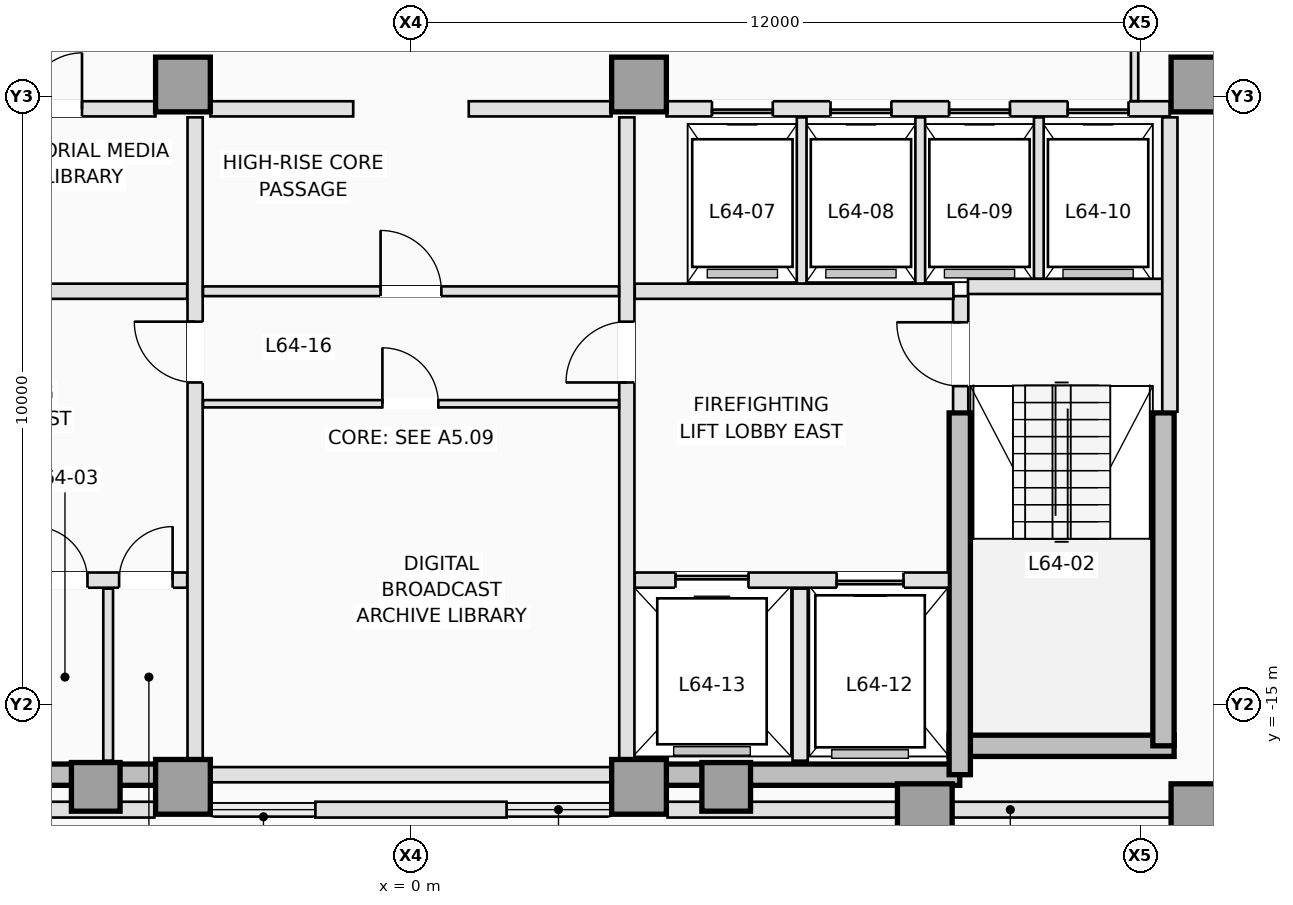
"""IFC4 building model, lengths in metres.
Left out: names, types, materials, properties, quantities, classifications, styles, units other than length and angle.
Written with IfcOpenShell. Run it as: python <this file> out.ifc"""

import sys

from ifc_helpers import new_model, si_unit, direction, frame, frame_2d, origin, origin_2d, place, context, subcontext, project, spatial, rectangle, extrude, element, fill, save


model = new_model("IFC4")
c1 = context("Model", 3, precision=1e-05, world=origin(), true_north=direction((0.0, 1.0)))
c2 = subcontext(c1, "Body", "Model", "MODEL_VIEW")
j1 = project(units=[si_unit("LENGTHUNIT", "METRE"), si_unit("PLANEANGLEUNIT", "RADIAN")], contexts=[c1])
p1 = place(None, origin())
s1 = spatial("IfcSite", under=j1, at=p1, CompositionType="ELEMENT")
p2 = place(p1, origin())
s2 = spatial("IfcBuilding", under=s1, at=p2, CompositionType="ELEMENT")
p3 = place(p2, frame((0.0, 0.0, 232.4)))
s3 = spatial("IfcBuildingStorey", under=s2, at=p3, CompositionType="ELEMENT", Elevation=232.4)
for number, where, z_axis, x_axis in (
    (1, (-9.025, -16.15, 0.0), (0.0, 0.0, 1.0), (1.0, 0.0, 0.0)),
    (2, (3.75, -16.15, 0.0), (0.0, 0.0, 1.0), (1.0, 0.0, 0.0)),
):
    element("IfcWall", number, at=place(p3, frame(where, z_axis=z_axis, x_axis=x_axis)), inside=s3, PredefinedType="SHEAR", context=c2, shape_type="SweptSolid", body=[
        extrude(rectangle(XDim=5.275, YDim=0.35, at=frame_2d((2.637, 0.0))), origin(), (0.0, 0.0, 1.0), 3.5),
    ])
p4 = place(p3, frame((8.85, -15.675, 0.0), z_axis=(0.0, 0.0, 1.0), x_axis=(1.0, 0.0, 0.0)))
e3 = element("IfcWall", 3, at=p4, inside=s3, PredefinedType="SHEAR", context=c2, shape_type="SweptSolid", body=[
    extrude(rectangle(XDim=3.7, YDim=0.35, at=frame_2d((1.85, 0.0))), origin(), (0.0, 0.0, 1.0), 3.5),
])
p5 = place(p3, frame((12.375, -15.675, 0.0), z_axis=(0.0, 0.0, 1.0), x_axis=(0.0, 1.0, 0.0)))
e4 = element("IfcWall", 4, at=p5, inside=s3, PredefinedType="SHEAR", context=c2, shape_type="SweptSolid", body=[
    extrude(rectangle(XDim=5.475, YDim=0.35, at=frame_2d((2.738, 0.0))), origin(), (0.0, 0.0, 1.0), 3.5),
])
p6 = place(p3, frame((9.025, -16.15, 0.0), z_axis=(0.0, 0.0, 1.0), x_axis=(0.0, 1.0, 0.0)))
e5 = element("IfcWall", 5, at=p6, inside=s3, PredefinedType="SHEAR", context=c2, shape_type="SweptSolid", body=[
    extrude(rectangle(XDim=5.95, YDim=0.35, at=frame_2d((2.975, 0.0))), origin(), (0.0, 0.0, 1.0), 3.5),
])
for number, where, z_axis, x_axis in (
    (6, (-3.75, -16.35, 0.0), (0.0, 0.0, 1.0), (1.0, 0.0, 0.0)),
    (7, (3.75, -16.35, 0.0), (0.0, 0.0, 1.0), (1.0, 0.0, 0.0)),
    (8, (8.45, -16.75, 0.0), (0.0, 0.0, 1.0), (1.0, 0.0, 0.0)),
    (9, (12.95, -16.75, 0.0), (0.0, 0.0, 1.0), (1.0, 0.0, 0.0)),
    (10, (-3.75, -4.8, 0.0), (0.0, 0.0, 1.0), (1.0, 0.0, 0.0)),
    (11, (3.75, -4.8, 0.0), (0.0, 0.0, 1.0), (1.0, 0.0, 0.0)),
    (12, (12.95, -4.8, 0.0), (0.0, 0.0, 1.0), (1.0, 0.0, 0.0)),
):
    element("IfcColumn", number, at=place(p3, frame(where, z_axis=z_axis, x_axis=x_axis)), inside=s3, PredefinedType="COLUMN", context=c2, shape_type="SweptSolid", body=[
        extrude(rectangle(XDim=0.9, YDim=0.9, at=origin_2d()), origin(), (0.0, 0.0, 1.0), 3.5),
    ])
for number, where, z_axis, x_axis in (
    (13, (-5.184, -16.35, 0.0), (0.0, 0.0, 1.0), (0.0, 1.0, 0.0)),
    (14, (5.184, -16.35, 0.0), (0.0, 0.0, 1.0), (0.0, 1.0, 0.0)),
):
    element("IfcColumn", number, at=place(p3, frame(where, z_axis=z_axis, x_axis=x_axis)), inside=s3, PredefinedType="COLUMN", context=c2, shape_type="SweptSolid", body=[
        extrude(rectangle(XDim=0.8, YDim=0.8, at=origin_2d()), origin(), (0.0, 0.0, 1.0), 3.5),
    ])
for number, where, z_axis, x_axis in (
    (15, (15.493, -16.725, 0.0), (0.0, 0.0, 1.0), (-1.0, 0.0, 0.0)),
    (16, (-4.22, -16.725, 0.0), (0.0, 0.0, 1.0), (-1.0, 0.0, 0.0)),
):
    element("IfcWall", number, at=place(p3, frame(where, z_axis=z_axis, x_axis=x_axis)), inside=s3, PredefinedType="STANDARD", context=c2, shape_type="SweptSolid", body=[
        extrude(rectangle(XDim=11.273, YDim=0.26, at=frame_2d((5.636, 0.0))), origin(), (0.0, 0.0, 1.0), 2.79),
    ])
p7 = place(p3, frame((1.572, -16.725, 0.0), z_axis=(0.0, 0.0, 1.0), x_axis=(-1.0, 0.0, 0.0)))
e17 = element("IfcWall", 17, at=p7, inside=s3, PredefinedType="STANDARD", context=c2, shape_type="SweptSolid", body=[
    extrude(rectangle(XDim=3.143, YDim=0.26, at=frame_2d((1.572, 0.0))), origin(), (0.0, 0.0, 1.0), 3.25),
])
p8 = place(p3, frame((9.04, -10.18, 0.0), z_axis=(0.0, 0.0, 1.0), x_axis=(0.0, 1.0, 0.0)))
e18 = element("IfcWall", 18, at=p8, inside=s3, PredefinedType="PARTITIONING", context=c2, shape_type="SweptSolid", body=[
    extrude(rectangle(XDim=1.9, YDim=0.25, at=frame_2d((0.95, 0.0))), origin(), (0.0, 0.0, 1.0), 3.25),
])
p9 = place(p8, frame((0.42, 0.0, 0.0)))
e19 = element("IfcOpeningElement", 19, at=p9, cuts=e18, PredefinedType="OPENING", context=c2, shape_type="SweptSolid", body=[
    extrude(rectangle(XDim=1.05, YDim=2.15, at=frame_2d((0.525, 1.075))), frame((0.0, 0.135, 0.0), z_axis=(0.0, -1.0, 0.0), x_axis=(1.0, 0.0, 0.0)), (0.0, 0.0, 1.0), 0.27),
])
p10 = place(p3, frame((9.16, -8.12, 0.0), z_axis=(0.0, 0.0, 1.0), x_axis=(1.0, 0.0, 0.0)))
e20 = element("IfcWall", 20, at=p10, inside=s3, PredefinedType="PARTITIONING", context=c2, shape_type="SweptSolid", body=[
    extrude(rectangle(XDim=3.22, YDim=0.25, at=frame_2d((1.61, 0.0))), origin(), (0.0, 0.0, 1.0), 3.25),
])
p11 = place(p3, frame((12.48, -10.18, 0.0), z_axis=(0.0, 0.0, 1.0), x_axis=(0.0, 1.0, 0.0)))
e21 = element("IfcWall", 21, at=p11, inside=s3, PredefinedType="PARTITIONING", context=c2, shape_type="SweptSolid", body=[
    extrude(rectangle(XDim=4.84, YDim=0.25, at=frame_2d((2.42, 0.0))), origin(), (0.0, 0.0, 1.0), 3.25),
])
p12 = place(p3, frame((-8.848, -12.95, 0.0), z_axis=(0.0, 0.0, 1.0), x_axis=(1.0, 0.0, 0.0)))
e22 = element("IfcWall", 22, at=p12, inside=s3, PredefinedType="PARTITIONING", context=c2, shape_type="SweptSolid", body=[
    extrude(rectangle(XDim=5.168, YDim=0.25, at=frame_2d((2.584, 0.0))), origin(), (0.0, 0.0, 1.0), 3.25),
])
p13 = place(p12, frame((0.748, 0.0, 0.0)))
e23 = element("IfcOpeningElement", 23, at=p13, cuts=e22, PredefinedType="OPENING", context=c2, shape_type="SweptSolid", body=[
    extrude(rectangle(XDim=1.1, YDim=2.15, at=frame_2d((0.55, 1.075))), frame((0.0, 0.135, 0.0), z_axis=(0.0, -1.0, 0.0), x_axis=(1.0, 0.0, 0.0)), (0.0, 0.0, 1.0), 0.27),
])
p14 = place(p12, frame((2.648, 0.0, 0.0)))
e24 = element("IfcOpeningElement", 24, at=p14, cuts=e22, PredefinedType="OPENING", context=c2, shape_type="SweptSolid", body=[
    extrude(rectangle(XDim=0.88, YDim=2.1, at=frame_2d((0.44, 1.05))), frame((0.0, 0.135, 0.0), z_axis=(0.0, -1.0, 0.0), x_axis=(1.0, 0.0, 0.0)), (0.0, 0.0, 1.0), 0.27),
])
p15 = place(p12, frame((4.048, 0.0, 0.0)))
e25 = element("IfcOpeningElement", 25, at=p15, cuts=e22, PredefinedType="OPENING", context=c2, shape_type="SweptSolid", body=[
    extrude(rectangle(XDim=0.88, YDim=2.1, at=frame_2d((0.44, 1.05))), frame((0.0, 0.135, 0.0), z_axis=(0.0, -1.0, 0.0), x_axis=(1.0, 0.0, 0.0)), (0.0, 0.0, 1.0), 0.27),
])
p16 = place(p3, frame((3.68, -12.95, 0.0), z_axis=(0.0, 0.0, 1.0), x_axis=(1.0, 0.0, 0.0)))
e26 = element("IfcWall", 26, at=p16, inside=s3, PredefinedType="PARTITIONING", context=c2, shape_type="SweptSolid", body=[
    extrude(rectangle(XDim=5.168, YDim=0.25, at=frame_2d((2.584, 0.0))), origin(), (0.0, 0.0, 1.0), 3.25),
])
p17 = place(p16, frame((3.32, 0.0, 0.0)))
e27 = element("IfcOpeningElement", 27, at=p17, cuts=e26, PredefinedType="OPENING", context=c2, shape_type="SweptSolid", body=[
    extrude(rectangle(XDim=1.1, YDim=2.15, at=frame_2d((0.55, 1.075))), frame((0.0, 0.135, 0.0), z_axis=(0.0, -1.0, 0.0), x_axis=(1.0, 0.0, 0.0)), (0.0, 0.0, 1.0), 0.27),
])
p18 = place(p16, frame((0.67, 0.0, 0.0)))
e28 = element("IfcOpeningElement", 28, at=p18, cuts=e26, PredefinedType="OPENING", context=c2, shape_type="SweptSolid", body=[
    extrude(rectangle(XDim=1.2, YDim=2.15, at=frame_2d((0.6, 1.075))), frame((0.0, 0.135, 0.0), z_axis=(0.0, -1.0, 0.0), x_axis=(1.0, 0.0, 0.0)), (0.0, 0.0, 1.0), 0.27),
])
p19 = place(p3, frame((-4.98, -15.92, 0.0), z_axis=(0.0, 0.0, 1.0), x_axis=(0.0, 1.0, 0.0)))
e29 = element("IfcWall", 29, at=p19, inside=s3, PredefinedType="PARTITIONING", context=c2, shape_type="SweptSolid", body=[
    extrude(rectangle(XDim=2.83, YDim=0.16, at=frame_2d((1.415, 0.0))), origin(), (0.0, 0.0, 1.0), 3.25),
])
p20 = place(p3, frame((6.4, -15.92, 0.0), z_axis=(0.0, 0.0, 1.0), x_axis=(0.0, 1.0, 0.0)))
e30 = element("IfcWall", 30, at=p20, inside=s3, PredefinedType="PARTITIONING", context=c2, shape_type="SweptSolid", body=[
    extrude(rectangle(XDim=2.83, YDim=0.25, at=frame_2d((1.415, 0.0))), origin(), (0.0, 0.0, 1.0), 3.25),
])
for number, where, z_axis, x_axis in (
    (31, (-8.92, -8.2, 0.0), (0.0, 0.0, 1.0), (1.0, 0.0, 0.0)),
    (32, (3.68, -8.2, 0.0), (0.0, 0.0, 1.0), (1.0, 0.0, 0.0)),
):
    element("IfcWall", number, at=place(p3, frame(where, z_axis=z_axis, x_axis=x_axis)), inside=s3, PredefinedType="PARTITIONING", context=c2, shape_type="SweptSolid", body=[
        extrude(rectangle(XDim=5.24, YDim=0.25, at=frame_2d((2.62, 0.0))), origin(), (0.0, 0.0, 1.0), 3.25),
    ])
p21 = place(p3, frame((-3.55, -15.898, 0.0), z_axis=(0.0, 0.0, 1.0), x_axis=(0.0, 1.0, 0.0)))
e33 = element("IfcWall", 33, at=p21, inside=s3, PredefinedType="PARTITIONING", context=c2, shape_type="SweptSolid", body=[
    extrude(rectangle(XDim=10.558, YDim=0.25, at=frame_2d((5.279, 0.0))), origin(), (0.0, 0.0, 1.0), 3.25),
])
p22 = place(p21, frame((6.198, 0.0, 0.0)))
e34 = element("IfcOpeningElement", 34, at=p22, cuts=e33, PredefinedType="OPENING", context=c2, shape_type="SweptSolid", body=[
    extrude(rectangle(XDim=1.0, YDim=2.15, at=frame_2d((0.5, 1.075))), frame((0.0, 0.135, 0.0), z_axis=(0.0, -1.0, 0.0), x_axis=(1.0, 0.0, 0.0)), (0.0, 0.0, 1.0), 0.27),
])
p23 = place(p3, frame((3.55, -15.898, 0.0), z_axis=(0.0, 0.0, 1.0), x_axis=(0.0, 1.0, 0.0)))
e35 = element("IfcWall", 35, at=p23, inside=s3, PredefinedType="PARTITIONING", context=c2, shape_type="SweptSolid", body=[
    extrude(rectangle(XDim=10.558, YDim=0.25, at=frame_2d((5.279, 0.0))), origin(), (0.0, 0.0, 1.0), 3.25),
])
p24 = place(p23, frame((6.198, 0.0, 0.0)))
e36 = element("IfcOpeningElement", 36, at=p24, cuts=e35, PredefinedType="OPENING", context=c2, shape_type="SweptSolid", body=[
    extrude(rectangle(XDim=1.0, YDim=2.15, at=frame_2d((0.5, 1.075))), frame((0.0, 0.135, 0.0), z_axis=(0.0, -1.0, 0.0), x_axis=(1.0, 0.0, 0.0)), (0.0, 0.0, 1.0), 0.27),
])
p25 = place(p3, frame((-12.48, -5.2, 0.0), z_axis=(0.0, 0.0, 1.0), x_axis=(1.0, 0.0, 0.0)))
e37 = element("IfcWall", 37, at=p25, inside=s3, PredefinedType="PARTITIONING", context=c2, shape_type="SweptSolid", body=[
    extrude(rectangle(XDim=8.278, YDim=0.25, at=frame_2d((4.139, 0.0))), origin(), (0.0, 0.0, 1.0), 3.25),
])
p26 = place(p25, frame((3.05, 0.0, 0.0)))
e38 = element("IfcOpeningElement", 38, at=p26, cuts=e37, PredefinedType="OPENING", context=c2, shape_type="SweptSolid", body=[
    extrude(rectangle(XDim=0.92, YDim=2.12, at=frame_2d((0.46, 1.06))), frame((0.0, 0.135, 0.0), z_axis=(0.0, -1.0, 0.0), x_axis=(1.0, 0.0, 0.0)), (0.0, 0.0, 1.0), 0.27),
])
p27 = place(p25, frame((6.15, 0.0, 0.0)))
e39 = element("IfcOpeningElement", 39, at=p27, cuts=e37, PredefinedType="OPENING", context=c2, shape_type="SweptSolid", body=[
    extrude(rectangle(XDim=0.92, YDim=2.12, at=frame_2d((0.46, 1.06))), frame((0.0, 0.135, 0.0), z_axis=(0.0, -1.0, 0.0), x_axis=(1.0, 0.0, 0.0)), (0.0, 0.0, 1.0), 0.27),
])
p28 = place(p3, frame((4.202, -5.2, 0.0), z_axis=(0.0, 0.0, 1.0), x_axis=(1.0, 0.0, 0.0)))
e40 = element("IfcWall", 40, at=p28, inside=s3, PredefinedType="PARTITIONING", context=c2, shape_type="SweptSolid", body=[
    extrude(rectangle(XDim=8.278, YDim=0.25, at=frame_2d((4.139, 0.0))), origin(), (0.0, 0.0, 1.0), 3.25),
])
p29 = place(p28, frame((0.748, 0.0, 0.0)))
e41 = element("IfcOpeningElement", 41, at=p29, cuts=e40, PredefinedType="OPENING", context=c2, shape_type="SweptSolid", body=[
    extrude(rectangle(XDim=1.0, YDim=2.15, at=frame_2d((0.5, 1.075))), frame((0.0, 0.135, 0.0), z_axis=(0.0, -1.0, 0.0), x_axis=(1.0, 0.0, 0.0)), (0.0, 0.0, 1.0), 0.27),
])
p30 = place(p28, frame((2.698, 0.0, 0.0)))
e42 = element("IfcOpeningElement", 42, at=p30, cuts=e40, PredefinedType="OPENING", context=c2, shape_type="SweptSolid", body=[
    extrude(rectangle(XDim=1.0, YDim=2.15, at=frame_2d((0.5, 1.075))), frame((0.0, 0.135, 0.0), z_axis=(0.0, -1.0, 0.0), x_axis=(1.0, 0.0, 0.0)), (0.0, 0.0, 1.0), 0.27),
])
p31 = place(p28, frame((4.648, 0.0, 0.0)))
e43 = element("IfcOpeningElement", 43, at=p31, cuts=e40, PredefinedType="OPENING", context=c2, shape_type="SweptSolid", body=[
    extrude(rectangle(XDim=1.0, YDim=2.15, at=frame_2d((0.5, 1.075))), frame((0.0, 0.135, 0.0), z_axis=(0.0, -1.0, 0.0), x_axis=(1.0, 0.0, 0.0)), (0.0, 0.0, 1.0), 0.27),
])
p32 = place(p28, frame((6.598, 0.0, 0.0)))
e44 = element("IfcOpeningElement", 44, at=p32, cuts=e40, PredefinedType="OPENING", context=c2, shape_type="SweptSolid", body=[
    extrude(rectangle(XDim=1.0, YDim=2.15, at=frame_2d((0.5, 1.075))), frame((0.0, 0.135, 0.0), z_axis=(0.0, -1.0, 0.0), x_axis=(1.0, 0.0, 0.0)), (0.0, 0.0, 1.0), 0.27),
])
for number, where, z_axis, x_axis in (
    (45, (-3.298, -5.2, 0.0), (0.0, 0.0, 1.0), (1.0, 0.0, 0.0)),
    (46, (0.95, -5.2, 0.0), (0.0, 0.0, 1.0), (1.0, 0.0, 0.0)),
):
    element("IfcWall", number, at=place(p3, frame(where, z_axis=z_axis, x_axis=x_axis)), inside=s3, PredefinedType="PARTITIONING", context=c2, shape_type="SweptSolid", body=[
        extrude(rectangle(XDim=2.348, YDim=0.25, at=frame_2d((1.174, 0.0))), origin(), (0.0, 0.0, 1.0), 3.25),
    ])
for number, where, z_axis, x_axis in (
    (47, (6.425, -8.073, 0.0), (0.0, 0.0, 1.0), (0.0, 1.0, 0.0)),
    (48, (8.375, -8.073, 0.0), (0.0, 0.0, 1.0), (0.0, 1.0, 0.0)),
):
    element("IfcWall", number, at=place(p3, frame(where, z_axis=z_axis, x_axis=x_axis)), inside=s3, PredefinedType="PARTITIONING", context=c2, shape_type="SweptSolid", body=[
        extrude(rectangle(XDim=2.733, YDim=0.16, at=frame_2d((1.366, 0.0))), origin(), (0.0, 0.0, 1.0), 3.25),
    ])
p33 = place(p3, frame((10.325, -7.993, 0.0), z_axis=(0.0, 0.0, 1.0), x_axis=(0.0, 1.0, 0.0)))
e49 = element("IfcWall", 49, at=p33, inside=s3, PredefinedType="PARTITIONING", context=c2, shape_type="SweptSolid", body=[
    extrude(rectangle(XDim=2.653, YDim=0.16, at=frame_2d((1.326, 0.0))), origin(), (0.0, 0.0, 1.0), 3.25),
])
p34 = place(p3, frame((-3.298, -16.15, 0.0), z_axis=(0.0, 0.0, 1.0), x_axis=(1.0, 0.0, 0.0)))
e50 = element("IfcWall", 50, at=p34, inside=s3, PredefinedType="PARTITIONING", context=c2, shape_type="SweptSolid", body=[
    extrude(rectangle(XDim=6.596, YDim=0.25, at=frame_2d((3.298, 0.0))), origin(), (0.0, 0.0, 1.0), 2.844),
])
p35 = place(p3, frame((-3.42, -8.2, 0.0), z_axis=(0.0, 0.0, 1.0), x_axis=(1.0, 0.0, 0.0)))
e51 = element("IfcWall", 51, at=p35, inside=s3, PredefinedType="PARTITIONING", context=c2, shape_type="SweptSolid", body=[
    extrude(rectangle(XDim=6.84, YDim=0.16, at=frame_2d((3.42, 0.0))), origin(), (0.0, 0.0, 1.0), 3.25),
])
p36 = place(p35, frame((2.92, 0.0, 0.0)))
e52 = element("IfcOpeningElement", 52, at=p36, cuts=e51, PredefinedType="OPENING", context=c2, shape_type="SweptSolid", body=[
    extrude(rectangle(XDim=1.0, YDim=2.15, at=frame_2d((0.5, 1.075))), frame((0.0, 0.09, 0.0), z_axis=(0.0, -1.0, 0.0), x_axis=(1.0, 0.0, 0.0)), (0.0, 0.0, 1.0), 0.18),
])
p37 = place(p3, frame((-3.42, -10.05, 0.0), z_axis=(0.0, 0.0, 1.0), x_axis=(1.0, 0.0, 0.0)))
e53 = element("IfcWall", 53, at=p37, inside=s3, PredefinedType="PARTITIONING", context=c2, shape_type="SweptSolid", body=[
    extrude(rectangle(XDim=6.84, YDim=0.12, at=frame_2d((3.42, 0.0))), origin(), (0.0, 0.0, 1.0), 3.25),
])
p38 = place(p37, frame((2.95, 0.0, 0.0)))
e54 = element("IfcOpeningElement", 54, at=p38, cuts=e53, PredefinedType="OPENING", context=c2, shape_type="SweptSolid", body=[
    extrude(rectangle(XDim=0.92, YDim=2.12, at=frame_2d((0.46, 1.06))), frame((0.0, 0.07, 0.0), z_axis=(0.0, -1.0, 0.0), x_axis=(1.0, 0.0, 0.0)), (0.0, 0.0, 1.0), 0.14),
])
p39 = place(p3, frame((11.9, -2.792, 0.0), z_axis=(0.0, 0.0, 1.0), x_axis=(0.0, -1.0, 0.0)))
e55 = element("IfcWall", 55, at=p39, inside=s3, PredefinedType="PARTITIONING", context=c2, shape_type="SweptSolid", body=[
    extrude(rectangle(XDim=2.281, YDim=0.12, at=frame_2d((1.141, 0.0))), origin(), (0.0, 0.0, 1.0), 3.25),
])
p40 = place(p29, origin())
e56 = element("IfcDoor", 56, at=p40, inside=s3, OperationType="SLIDING_TO_RIGHT", PredefinedType="DOOR", context=c2, shape_type="SweptSolid", body=[
    extrude(rectangle(XDim=1.0, YDim=2.15, at=frame_2d((0.5, 1.075))), frame((0.0, 0.025, 0.0), z_axis=(0.0, -1.0, 0.0), x_axis=(1.0, 0.0, 0.0)), (0.0, 0.0, 1.0), 0.05),
])
fill(e41, e56)
p41 = place(p30, origin())
e57 = element("IfcDoor", 57, at=p41, inside=s3, OperationType="SLIDING_TO_RIGHT", PredefinedType="DOOR", context=c2, shape_type="SweptSolid", body=[
    extrude(rectangle(XDim=1.0, YDim=2.15, at=frame_2d((0.5, 1.075))), frame((0.0, 0.025, 0.0), z_axis=(0.0, -1.0, 0.0), x_axis=(1.0, 0.0, 0.0)), (0.0, 0.0, 1.0), 0.05),
])
fill(e42, e57)
p42 = place(p31, origin())
e58 = element("IfcDoor", 58, at=p42, inside=s3, OperationType="SLIDING_TO_RIGHT", PredefinedType="DOOR", context=c2, shape_type="SweptSolid", body=[
    extrude(rectangle(XDim=1.0, YDim=2.15, at=frame_2d((0.5, 1.075))), frame((0.0, 0.025, 0.0), z_axis=(0.0, -1.0, 0.0), x_axis=(1.0, 0.0, 0.0)), (0.0, 0.0, 1.0), 0.05),
])
fill(e43, e58)
p43 = place(p32, origin())
e59 = element("IfcDoor", 59, at=p43, inside=s3, OperationType="SLIDING_TO_RIGHT", PredefinedType="DOOR", context=c2, shape_type="SweptSolid", body=[
    extrude(rectangle(XDim=1.0, YDim=2.15, at=frame_2d((0.5, 1.075))), frame((0.0, 0.025, 0.0), z_axis=(0.0, -1.0, 0.0), x_axis=(1.0, 0.0, 0.0)), (0.0, 0.0, 1.0), 0.05),
])
fill(e44, e59)
p44 = place(p17, origin())
e60 = element("IfcDoor", 60, at=p44, inside=s3, OperationType="SLIDING_TO_RIGHT", PredefinedType="DOOR", context=c2, shape_type="SweptSolid", body=[
    extrude(rectangle(XDim=1.1, YDim=2.15, at=frame_2d((0.55, 1.075))), frame((0.0, 0.025, 0.0), z_axis=(0.0, -1.0, 0.0), x_axis=(1.0, 0.0, 0.0)), (0.0, 0.0, 1.0), 0.05),
])
fill(e27, e60)
p45 = place(p18, origin())
e61 = element("IfcDoor", 61, at=p45, inside=s3, OperationType="SLIDING_TO_LEFT", PredefinedType="DOOR", context=c2, shape_type="SweptSolid", body=[
    extrude(rectangle(XDim=1.2, YDim=2.15, at=frame_2d((0.6, 1.075))), frame((0.0, 0.025, 0.0), z_axis=(0.0, -1.0, 0.0), x_axis=(1.0, 0.0, 0.0)), (0.0, 0.0, 1.0), 0.05),
])
fill(e28, e61)
p46 = place(p9, origin())
e62 = element("IfcDoor", 62, at=p46, inside=s3, OperationType="SINGLE_SWING_RIGHT", PredefinedType="DOOR", context=c2, shape_type="SweptSolid", body=[
    extrude(rectangle(XDim=1.05, YDim=2.15, at=frame_2d((0.525, 1.075))), frame((0.0, 0.025, 0.0), z_axis=(0.0, -1.0, 0.0), x_axis=(1.0, 0.0, 0.0)), (0.0, 0.0, 1.0), 0.05),
])
fill(e19, e62)
p47 = place(p14, origin())
e63 = element("IfcDoor", 63, at=p47, inside=s3, OperationType="SINGLE_SWING_LEFT", PredefinedType="TRAPDOOR", context=c2, shape_type="SweptSolid", body=[
    extrude(rectangle(XDim=0.88, YDim=2.1, at=frame_2d((0.44, 1.05))), frame((0.0, 0.025, 0.0), z_axis=(0.0, -1.0, 0.0), x_axis=(1.0, 0.0, 0.0)), (0.0, 0.0, 1.0), 0.05),
])
fill(e24, e63)
p48 = place(p15, origin())
e64 = element("IfcDoor", 64, at=p48, inside=s3, OperationType="SINGLE_SWING_RIGHT", PredefinedType="TRAPDOOR", context=c2, shape_type="SweptSolid", body=[
    extrude(rectangle(XDim=0.88, YDim=2.1, at=frame_2d((0.44, 1.05))), frame((0.0, 0.025, 0.0), z_axis=(0.0, -1.0, 0.0), x_axis=(1.0, 0.0, 0.0)), (0.0, 0.0, 1.0), 0.05),
])
fill(e25, e64)
p49 = place(p22, origin())
e65 = element("IfcDoor", 65, at=p49, inside=s3, OperationType="SINGLE_SWING_RIGHT", PredefinedType="DOOR", context=c2, shape_type="SweptSolid", body=[
    extrude(rectangle(XDim=1.0, YDim=2.15, at=frame_2d((0.5, 1.075))), frame((0.0, 0.025, 0.0), z_axis=(0.0, -1.0, 0.0), x_axis=(1.0, 0.0, 0.0)), (0.0, 0.0, 1.0), 0.05),
])
fill(e34, e65)
p50 = place(p24, origin())
e66 = element("IfcDoor", 66, at=p50, inside=s3, OperationType="SINGLE_SWING_LEFT", PredefinedType="DOOR", context=c2, shape_type="SweptSolid", body=[
    extrude(rectangle(XDim=1.0, YDim=2.15, at=frame_2d((0.5, 1.075))), frame((0.0, 0.025, 0.0), z_axis=(0.0, -1.0, 0.0), x_axis=(1.0, 0.0, 0.0)), (0.0, 0.0, 1.0), 0.05),
])
fill(e36, e66)
p51 = place(p27, origin())
e67 = element("IfcDoor", 67, at=p51, inside=s3, OperationType="SINGLE_SWING_RIGHT", PredefinedType="DOOR", context=c2, shape_type="SweptSolid", body=[
    extrude(rectangle(XDim=0.92, YDim=2.12, at=frame_2d((0.46, 1.06))), frame((0.0, 0.025, 0.0), z_axis=(0.0, -1.0, 0.0), x_axis=(1.0, 0.0, 0.0)), (0.0, 0.0, 1.0), 0.05),
])
fill(e39, e67)
p52 = place(p36, origin())
e68 = element("IfcDoor", 68, at=p52, inside=s3, OperationType="SINGLE_SWING_LEFT", PredefinedType="DOOR", context=c2, shape_type="SweptSolid", body=[
    extrude(rectangle(XDim=1.0, YDim=2.15, at=frame_2d((0.5, 1.075))), frame((0.0, 0.025, 0.0), z_axis=(0.0, -1.0, 0.0), x_axis=(1.0, 0.0, 0.0)), (0.0, 0.0, 1.0), 0.05),
])
fill(e52, e68)
p53 = place(p38, origin())
e69 = element("IfcDoor", 69, at=p53, inside=s3, OperationType="SINGLE_SWING_LEFT", PredefinedType="DOOR", context=c2, shape_type="SweptSolid", body=[
    extrude(rectangle(XDim=0.92, YDim=2.12, at=frame_2d((0.46, 1.06))), frame((0.0, 0.025, 0.0), z_axis=(0.0, -1.0, 0.0), x_axis=(1.0, 0.0, 0.0)), (0.0, 0.0, 1.0), 0.05),
])
fill(e54, e69)
save(model, sys.argv[1])
